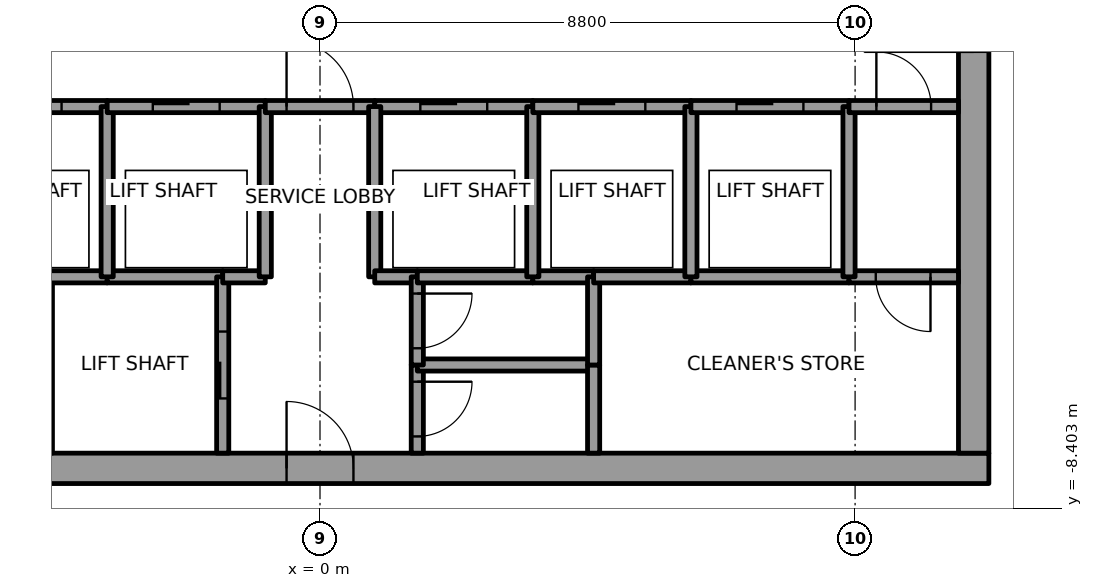
"""IFC4 building model, lengths in metres.
Left out: names, types, materials, properties, quantities, classifications, styles, units other than length and angle.
Written with IfcOpenShell. Run it as: python <this file> out.ifc"""

import sys

from ifc_helpers import new_model, si_unit, direction, frame, frame_2d, origin, place, context, subcontext, project, spatial, rectangle, extrude, element, fill, save


model = new_model("IFC4")
c1 = context("Model", 3, precision=1e-05, world=origin(), true_north=direction((0.0, 1.0)))
c2 = subcontext(c1, "Body", "Model", "MODEL_VIEW")
j1 = project(units=[si_unit("LENGTHUNIT", "METRE"), si_unit("PLANEANGLEUNIT", "RADIAN")], contexts=[c1])
p1 = place(None, origin())
s1 = spatial("IfcSite", under=j1, at=p1, CompositionType="ELEMENT")
p2 = place(p1, origin())
s2 = spatial("IfcBuilding", under=s1, at=p2, CompositionType="ELEMENT")
p3 = place(p2, frame((0.0, 0.0, 239.0)))
s3 = spatial("IfcBuildingStorey", under=s2, at=p3, CompositionType="ELEMENT", Elevation=239.0)
p4 = place(p3, frame((-11.0, -7.75, 0.0), z_axis=(0.0, 0.0, 1.0), x_axis=(1.0, 0.0, 0.0)))
e1 = element("IfcWall", 1, at=p4, inside=s3, PredefinedType="SHEAR", context=c2, shape_type="SweptSolid", body=[
    extrude(rectangle(XDim=22.0, YDim=0.5, at=frame_2d((11.0, 0.0))), origin(), (0.0, 0.0, 1.0), 4.0),
])
p5 = place(p4, frame((10.45, 0.0, 0.0)))
e2 = element("IfcOpeningElement", 2, at=p5, cuts=e1, PredefinedType="OPENING", context=c2, shape_type="SweptSolid", body=[
    extrude(rectangle(XDim=1.1, YDim=2.1, at=frame_2d((0.55, 1.05))), frame((0.0, 0.25, 0.0), z_axis=(0.0, -1.0, 0.0), x_axis=(1.0, 0.0, 0.0)), (0.0, 0.0, 1.0), 0.5),
])
p6 = place(p3, frame((10.75, -7.5, 0.0), z_axis=(0.0, 0.0, 1.0), x_axis=(0.0, 1.0, 0.0)))
e3 = element("IfcWall", 3, at=p6, inside=s3, PredefinedType="SHEAR", context=c2, shape_type="SweptSolid", body=[
    extrude(rectangle(XDim=15.0, YDim=0.5, at=frame_2d((7.5, 0.0))), origin(), (0.0, 0.0, 1.0), 4.0),
])
p7 = place(p6, frame((6.6, 0.0, 0.0)))
e4 = element("IfcOpeningElement", 4, at=p7, cuts=e3, PredefinedType="OPENING", context=c2, shape_type="SweptSolid", body=[
    extrude(rectangle(XDim=1.8, YDim=2.1, at=frame_2d((0.9, 1.05))), frame((0.0, 0.25, 0.0), z_axis=(0.0, -1.0, 0.0), x_axis=(1.0, 0.0, 0.0)), (0.0, 0.0, 1.0), 0.5),
])
p8 = place(p3, frame((-6.1, -1.8, 0.0), z_axis=(0.0, 0.0, 1.0), x_axis=(1.0, 0.0, 0.0)))
e5 = element("IfcWall", 5, at=p8, inside=s3, PredefinedType="SOLIDWALL", context=c2, shape_type="SweptSolid", body=[
    extrude(rectangle(XDim=2.6, YDim=0.2, at=frame_2d((1.3, 0.0))), origin(), (0.0, 0.0, 1.0), 3.85),
])
p9 = place(p8, frame((0.75, 0.0, 0.0)))
e6 = element("IfcOpeningElement", 6, at=p9, cuts=e5, PredefinedType="OPENING", context=c2, shape_type="SweptSolid", body=[
    extrude(rectangle(XDim=1.1, YDim=2.1, at=frame_2d((0.55, 1.05))), frame((0.0, 0.1, 0.0), z_axis=(0.0, -1.0, 0.0), x_axis=(1.0, 0.0, 0.0)), (0.0, 0.0, 1.0), 0.2),
])
p10 = place(p3, frame((-4.5, -4.6, 0.0), z_axis=(0.0, 0.0, 1.0), x_axis=(1.0, 0.0, 0.0)))
e7 = element("IfcWall", 7, at=p10, inside=s3, PredefinedType="SOLIDWALL", context=c2, shape_type="SweptSolid", body=[
    extrude(rectangle(XDim=1.0, YDim=0.2, at=frame_2d((0.5, 0.0))), origin(), (0.0, 0.0, 1.0), 3.85),
])
p11 = place(p3, frame((-3.5, -4.6, 0.0), z_axis=(0.0, 0.0, 1.0), x_axis=(1.0, 0.0, 0.0)))
e8 = element("IfcWall", 8, at=p11, inside=s3, PredefinedType="SOLIDWALL", context=c2, shape_type="SweptSolid", body=[
    extrude(rectangle(XDim=1.9, YDim=0.2, at=frame_2d((0.95, 0.0))), origin(), (0.0, 0.0, 1.0), 3.85),
])
p12 = place(p3, frame((-3.5, -4.6, 0.0), z_axis=(0.0, 0.0, 1.0), x_axis=(0.0, 1.0, 0.0)))
e9 = element("IfcWall", 9, at=p12, inside=s3, PredefinedType="SOLIDWALL", context=c2, shape_type="SweptSolid", body=[
    extrude(rectangle(XDim=2.8, YDim=0.2, at=frame_2d((1.4, 0.0))), origin(), (0.0, 0.0, 1.0), 3.85),
])
p13 = place(p3, frame((-3.5, -1.8, 0.0), z_axis=(0.0, 0.0, 1.0), x_axis=(1.0, 0.0, 0.0)))
e10 = element("IfcWall", 10, at=p13, inside=s3, PredefinedType="SOLIDWALL", context=c2, shape_type="SweptSolid", body=[
    extrude(rectangle(XDim=2.6, YDim=0.2, at=frame_2d((1.3, 0.0))), origin(), (0.0, 0.0, 1.0), 3.85),
])
p14 = place(p13, frame((0.75, 0.0, 0.0)))
e11 = element("IfcOpeningElement", 11, at=p14, cuts=e10, PredefinedType="OPENING", context=c2, shape_type="SweptSolid", body=[
    extrude(rectangle(XDim=1.1, YDim=2.1, at=frame_2d((0.55, 1.05))), frame((0.0, 0.1, 0.0), z_axis=(0.0, -1.0, 0.0), x_axis=(1.0, 0.0, 0.0)), (0.0, 0.0, 1.0), 0.2),
])
p15 = place(p3, frame((-1.6, -7.5, 0.0), z_axis=(0.0, 0.0, 1.0), x_axis=(0.0, 1.0, 0.0)))
e12 = element("IfcWall", 12, at=p15, inside=s3, PredefinedType="SOLIDWALL", context=c2, shape_type="SweptSolid", body=[
    extrude(rectangle(XDim=2.9, YDim=0.2, at=frame_2d((1.45, 0.0))), origin(), (0.0, 0.0, 1.0), 3.85),
])
p16 = place(p15, frame((0.9, 0.0, 0.0)))
e13 = element("IfcOpeningElement", 13, at=p16, cuts=e12, PredefinedType="OPENING", context=c2, shape_type="SweptSolid", body=[
    extrude(rectangle(XDim=1.1, YDim=2.1, at=frame_2d((0.55, 1.05))), frame((0.0, 0.1, 0.0), z_axis=(0.0, -1.0, 0.0), x_axis=(1.0, 0.0, 0.0)), (0.0, 0.0, 1.0), 0.2),
])
p17 = place(p3, frame((-1.6, -4.6, 0.0), z_axis=(0.0, 0.0, 1.0), x_axis=(1.0, 0.0, 0.0)))
e14 = element("IfcWall", 14, at=p17, inside=s3, PredefinedType="SOLIDWALL", context=c2, shape_type="SweptSolid", body=[
    extrude(rectangle(XDim=0.7, YDim=0.2, at=frame_2d((0.35, 0.0))), origin(), (0.0, 0.0, 1.0), 3.85),
])
p18 = place(p3, frame((-0.9, -4.6, 0.0), z_axis=(0.0, 0.0, 1.0), x_axis=(0.0, 1.0, 0.0)))
e15 = element("IfcWall", 15, at=p18, inside=s3, PredefinedType="SOLIDWALL", context=c2, shape_type="SweptSolid", body=[
    extrude(rectangle(XDim=2.8, YDim=0.2, at=frame_2d((1.4, 0.0))), origin(), (0.0, 0.0, 1.0), 3.85),
])
p19 = place(p3, frame((-0.9, -1.8, 0.0), z_axis=(0.0, 0.0, 1.0), x_axis=(1.0, 0.0, 0.0)))
e16 = element("IfcWall", 16, at=p19, inside=s3, PredefinedType="SOLIDWALL", context=c2, shape_type="SweptSolid", body=[
    extrude(rectangle(XDim=1.8, YDim=0.2, at=frame_2d((0.9, 0.0))), origin(), (0.0, 0.0, 1.0), 3.85),
])
p20 = place(p19, frame((0.35, 0.0, 0.0)))
e17 = element("IfcOpeningElement", 17, at=p20, cuts=e16, PredefinedType="OPENING", context=c2, shape_type="SweptSolid", body=[
    extrude(rectangle(XDim=1.1, YDim=2.1, at=frame_2d((0.55, 1.05))), frame((0.0, 0.1, 0.0), z_axis=(0.0, -1.0, 0.0), x_axis=(1.0, 0.0, 0.0)), (0.0, 0.0, 1.0), 0.2),
])
p21 = place(p3, frame((0.9, -1.8, 0.0), z_axis=(0.0, 0.0, 1.0), x_axis=(1.0, 0.0, 0.0)))
e18 = element("IfcWall", 18, at=p21, inside=s3, PredefinedType="SOLIDWALL", context=c2, shape_type="SweptSolid", body=[
    extrude(rectangle(XDim=2.6, YDim=0.2, at=frame_2d((1.3, 0.0))), origin(), (0.0, 0.0, 1.0), 3.85),
])
p22 = place(p21, frame((0.75, 0.0, 0.0)))
e19 = element("IfcOpeningElement", 19, at=p22, cuts=e18, PredefinedType="OPENING", context=c2, shape_type="SweptSolid", body=[
    extrude(rectangle(XDim=1.1, YDim=2.1, at=frame_2d((0.55, 1.05))), frame((0.0, 0.1, 0.0), z_axis=(0.0, -1.0, 0.0), x_axis=(1.0, 0.0, 0.0)), (0.0, 0.0, 1.0), 0.2),
])
p23 = place(p3, frame((0.9, -1.8, 0.0), z_axis=(0.0, 0.0, 1.0), x_axis=(0.0, -1.0, 0.0)))
e20 = element("IfcWall", 20, at=p23, inside=s3, PredefinedType="SOLIDWALL", context=c2, shape_type="SweptSolid", body=[
    extrude(rectangle(XDim=2.8, YDim=0.2, at=frame_2d((1.4, 0.0))), origin(), (0.0, 0.0, 1.0), 3.85),
])
p24 = place(p3, frame((0.9, -4.6, 0.0), z_axis=(0.0, 0.0, 1.0), x_axis=(1.0, 0.0, 0.0)))
e21 = element("IfcWall", 21, at=p24, inside=s3, PredefinedType="SOLIDWALL", context=c2, shape_type="SweptSolid", body=[
    extrude(rectangle(XDim=0.7, YDim=0.2, at=frame_2d((0.35, 0.0))), origin(), (0.0, 0.0, 1.0), 3.85),
])
p25 = place(p3, frame((1.6, -6.05, 0.0), z_axis=(0.0, 0.0, 1.0), x_axis=(0.0, -1.0, 0.0)))
e22 = element("IfcWall", 22, at=p25, inside=s3, PredefinedType="SOLIDWALL", context=c2, shape_type="SweptSolid", body=[
    extrude(rectangle(XDim=1.45, YDim=0.2, at=frame_2d((0.725, 0.0))), origin(), (0.0, 0.0, 1.0), 3.85),
])
p26 = place(p25, frame((0.275, 0.0, 0.0)))
e23 = element("IfcOpeningElement", 23, at=p26, cuts=e22, PredefinedType="OPENING", context=c2, shape_type="SweptSolid", body=[
    extrude(rectangle(XDim=0.9, YDim=2.1, at=frame_2d((0.45, 1.05))), frame((0.0, 0.1, 0.0), z_axis=(0.0, -1.0, 0.0), x_axis=(1.0, 0.0, 0.0)), (0.0, 0.0, 1.0), 0.2),
])
p27 = place(p3, frame((4.5, -6.05, 0.0), z_axis=(0.0, 0.0, 1.0), x_axis=(-1.0, 0.0, 0.0)))
e24 = element("IfcWall", 24, at=p27, inside=s3, PredefinedType="SOLIDWALL", context=c2, shape_type="SweptSolid", body=[
    extrude(rectangle(XDim=2.9, YDim=0.2, at=frame_2d((1.45, 0.0))), origin(), (0.0, 0.0, 1.0), 3.85),
])
p28 = place(p3, frame((1.6, -4.6, 0.0), z_axis=(0.0, 0.0, 1.0), x_axis=(0.0, -1.0, 0.0)))
e25 = element("IfcWall", 25, at=p28, inside=s3, PredefinedType="SOLIDWALL", context=c2, shape_type="SweptSolid", body=[
    extrude(rectangle(XDim=1.45, YDim=0.2, at=frame_2d((0.725, 0.0))), origin(), (0.0, 0.0, 1.0), 3.85),
])
p29 = place(p28, frame((0.275, 0.0, 0.0)))
e26 = element("IfcOpeningElement", 26, at=p29, cuts=e25, PredefinedType="OPENING", context=c2, shape_type="SweptSolid", body=[
    extrude(rectangle(XDim=0.9, YDim=2.1, at=frame_2d((0.45, 1.05))), frame((0.0, 0.1, 0.0), z_axis=(0.0, -1.0, 0.0), x_axis=(1.0, 0.0, 0.0)), (0.0, 0.0, 1.0), 0.2),
])
p30 = place(p3, frame((3.5, -4.6, 0.0), z_axis=(0.0, 0.0, 1.0), x_axis=(-1.0, 0.0, 0.0)))
e27 = element("IfcWall", 27, at=p30, inside=s3, PredefinedType="SOLIDWALL", context=c2, shape_type="SweptSolid", body=[
    extrude(rectangle(XDim=1.9, YDim=0.2, at=frame_2d((0.95, 0.0))), origin(), (0.0, 0.0, 1.0), 3.85),
])
p31 = place(p3, frame((4.5, -4.6, 0.0), z_axis=(0.0, 0.0, 1.0), x_axis=(-1.0, 0.0, 0.0)))
e28 = element("IfcWall", 28, at=p31, inside=s3, PredefinedType="SOLIDWALL", context=c2, shape_type="SweptSolid", body=[
    extrude(rectangle(XDim=1.0, YDim=0.2, at=frame_2d((0.5, 0.0))), origin(), (0.0, 0.0, 1.0), 3.85),
])
p32 = place(p3, frame((3.5, -4.6, 0.0), z_axis=(0.0, 0.0, 1.0), x_axis=(0.0, 1.0, 0.0)))
e29 = element("IfcWall", 29, at=p32, inside=s3, PredefinedType="SOLIDWALL", context=c2, shape_type="SweptSolid", body=[
    extrude(rectangle(XDim=2.8, YDim=0.2, at=frame_2d((1.4, 0.0))), origin(), (0.0, 0.0, 1.0), 3.85),
])
p33 = place(p3, frame((3.5, -1.8, 0.0), z_axis=(0.0, 0.0, 1.0), x_axis=(1.0, 0.0, 0.0)))
e30 = element("IfcWall", 30, at=p33, inside=s3, PredefinedType="SOLIDWALL", context=c2, shape_type="SweptSolid", body=[
    extrude(rectangle(XDim=2.6, YDim=0.2, at=frame_2d((1.3, 0.0))), origin(), (0.0, 0.0, 1.0), 3.85),
])
p34 = place(p33, frame((0.75, 0.0, 0.0)))
e31 = element("IfcOpeningElement", 31, at=p34, cuts=e30, PredefinedType="OPENING", context=c2, shape_type="SweptSolid", body=[
    extrude(rectangle(XDim=1.1, YDim=2.1, at=frame_2d((0.55, 1.05))), frame((0.0, 0.1, 0.0), z_axis=(0.0, -1.0, 0.0), x_axis=(1.0, 0.0, 0.0)), (0.0, 0.0, 1.0), 0.2),
])
for number, where, z_axis, x_axis in (
    (32, (4.5, -6.05, 0.0), (0.0, 0.0, 1.0), (0.0, -1.0, 0.0)),
    (33, (4.5, -4.6, 0.0), (0.0, 0.0, 1.0), (0.0, -1.0, 0.0)),
):
    element("IfcWall", number, at=place(p3, frame(where, z_axis=z_axis, x_axis=x_axis)), inside=s3, PredefinedType="SOLIDWALL", context=c2, shape_type="SweptSolid", body=[
        extrude(rectangle(XDim=1.45, YDim=0.2, at=frame_2d((0.725, 0.0))), origin(), (0.0, 0.0, 1.0), 3.85),
    ])
p35 = place(p3, frame((6.1, -4.6, 0.0), z_axis=(0.0, 0.0, 1.0), x_axis=(-1.0, 0.0, 0.0)))
e34 = element("IfcWall", 34, at=p35, inside=s3, PredefinedType="SOLIDWALL", context=c2, shape_type="SweptSolid", body=[
    extrude(rectangle(XDim=1.6, YDim=0.2, at=frame_2d((0.8, 0.0))), origin(), (0.0, 0.0, 1.0), 3.85),
])
p36 = place(p3, frame((8.7, -4.6, 0.0), z_axis=(0.0, 0.0, 1.0), x_axis=(-1.0, 0.0, 0.0)))
e35 = element("IfcWall", 35, at=p36, inside=s3, PredefinedType="SOLIDWALL", context=c2, shape_type="SweptSolid", body=[
    extrude(rectangle(XDim=2.6, YDim=0.2, at=frame_2d((1.3, 0.0))), origin(), (0.0, 0.0, 1.0), 3.85),
])
p37 = place(p3, frame((6.1, -4.6, 0.0), z_axis=(0.0, 0.0, 1.0), x_axis=(0.0, 1.0, 0.0)))
e36 = element("IfcWall", 36, at=p37, inside=s3, PredefinedType="SOLIDWALL", context=c2, shape_type="SweptSolid", body=[
    extrude(rectangle(XDim=2.8, YDim=0.2, at=frame_2d((1.4, 0.0))), origin(), (0.0, 0.0, 1.0), 3.85),
])
p38 = place(p3, frame((6.1, -1.8, 0.0), z_axis=(0.0, 0.0, 1.0), x_axis=(1.0, 0.0, 0.0)))
e37 = element("IfcWall", 37, at=p38, inside=s3, PredefinedType="SOLIDWALL", context=c2, shape_type="SweptSolid", body=[
    extrude(rectangle(XDim=2.6, YDim=0.2, at=frame_2d((1.3, 0.0))), origin(), (0.0, 0.0, 1.0), 3.85),
])
p39 = place(p38, frame((0.75, 0.0, 0.0)))
e38 = element("IfcOpeningElement", 38, at=p39, cuts=e37, PredefinedType="OPENING", context=c2, shape_type="SweptSolid", body=[
    extrude(rectangle(XDim=1.1, YDim=2.1, at=frame_2d((0.55, 1.05))), frame((0.0, 0.1, 0.0), z_axis=(0.0, -1.0, 0.0), x_axis=(1.0, 0.0, 0.0)), (0.0, 0.0, 1.0), 0.2),
])
p40 = place(p3, frame((10.5, -4.6, 0.0), z_axis=(0.0, 0.0, 1.0), x_axis=(-1.0, 0.0, 0.0)))
e39 = element("IfcWall", 39, at=p40, inside=s3, PredefinedType="SOLIDWALL", context=c2, shape_type="SweptSolid", body=[
    extrude(rectangle(XDim=1.8, YDim=0.2, at=frame_2d((0.9, 0.0))), origin(), (0.0, 0.0, 1.0), 3.85),
])
p41 = place(p40, frame((0.46, 0.0, 0.0)))
e40 = element("IfcOpeningElement", 40, at=p41, cuts=e39, PredefinedType="OPENING", context=c2, shape_type="SweptSolid", body=[
    extrude(rectangle(XDim=0.9, YDim=2.1, at=frame_2d((0.45, 1.05))), frame((0.0, 0.1, 0.0), z_axis=(0.0, -1.0, 0.0), x_axis=(1.0, 0.0, 0.0)), (0.0, 0.0, 1.0), 0.2),
])
p42 = place(p3, frame((8.7, -1.8, 0.0), z_axis=(0.0, 0.0, 1.0), x_axis=(0.0, -1.0, 0.0)))
e41 = element("IfcWall", 41, at=p42, inside=s3, PredefinedType="SOLIDWALL", context=c2, shape_type="SweptSolid", body=[
    extrude(rectangle(XDim=2.8, YDim=0.2, at=frame_2d((1.4, 0.0))), origin(), (0.0, 0.0, 1.0), 3.85),
])
p43 = place(p3, frame((8.7, -1.8, 0.0), z_axis=(0.0, 0.0, 1.0), x_axis=(1.0, 0.0, 0.0)))
e42 = element("IfcWall", 42, at=p43, inside=s3, PredefinedType="SOLIDWALL", context=c2, shape_type="SweptSolid", body=[
    extrude(rectangle(XDim=1.8, YDim=0.2, at=frame_2d((0.9, 0.0))), origin(), (0.0, 0.0, 1.0), 3.85),
])
p44 = place(p43, frame((0.45, 0.0, 0.0)))
e43 = element("IfcOpeningElement", 43, at=p44, cuts=e42, PredefinedType="OPENING", context=c2, shape_type="SweptSolid", body=[
    extrude(rectangle(XDim=0.9, YDim=2.1, at=frame_2d((0.45, 1.05))), frame((0.0, 0.1, 0.0), z_axis=(0.0, -1.0, 0.0), x_axis=(1.0, 0.0, 0.0)), (0.0, 0.0, 1.0), 0.2),
])
p45 = place(p9, origin())
e44 = element("IfcDoor", 44, at=p45, inside=s3, OperationType="SLIDING_TO_LEFT", PredefinedType="DOOR", context=c2, shape_type="SweptSolid", body=[
    extrude(rectangle(XDim=1.1, YDim=2.1, at=frame_2d((0.55, 1.05))), frame((0.0, 0.025, 0.0), z_axis=(0.0, -1.0, 0.0), x_axis=(1.0, 0.0, 0.0)), (0.0, 0.0, 1.0), 0.05),
])
fill(e6, e44)
p46 = place(p14, origin())
e45 = element("IfcDoor", 45, at=p46, inside=s3, OperationType="SLIDING_TO_RIGHT", PredefinedType="DOOR", context=c2, shape_type="SweptSolid", body=[
    extrude(rectangle(XDim=1.1, YDim=2.1, at=frame_2d((0.55, 1.05))), frame((0.0, 0.025, 0.0), z_axis=(0.0, -1.0, 0.0), x_axis=(1.0, 0.0, 0.0)), (0.0, 0.0, 1.0), 0.05),
])
fill(e11, e45)
p47 = place(p22, origin())
e46 = element("IfcDoor", 46, at=p47, inside=s3, OperationType="SLIDING_TO_LEFT", PredefinedType="DOOR", context=c2, shape_type="SweptSolid", body=[
    extrude(rectangle(XDim=1.1, YDim=2.1, at=frame_2d((0.55, 1.05))), frame((0.0, 0.025, 0.0), z_axis=(0.0, -1.0, 0.0), x_axis=(1.0, 0.0, 0.0)), (0.0, 0.0, 1.0), 0.05),
])
fill(e19, e46)
p48 = place(p34, origin())
e47 = element("IfcDoor", 47, at=p48, inside=s3, OperationType="SLIDING_TO_LEFT", PredefinedType="DOOR", context=c2, shape_type="SweptSolid", body=[
    extrude(rectangle(XDim=1.1, YDim=2.1, at=frame_2d((0.55, 1.05))), frame((0.0, 0.025, 0.0), z_axis=(0.0, -1.0, 0.0), x_axis=(1.0, 0.0, 0.0)), (0.0, 0.0, 1.0), 0.05),
])
fill(e31, e47)
p49 = place(p39, origin())
e48 = element("IfcDoor", 48, at=p49, inside=s3, OperationType="SLIDING_TO_RIGHT", PredefinedType="DOOR", context=c2, shape_type="SweptSolid", body=[
    extrude(rectangle(XDim=1.1, YDim=2.1, at=frame_2d((0.55, 1.05))), frame((0.0, 0.025, 0.0), z_axis=(0.0, -1.0, 0.0), x_axis=(1.0, 0.0, 0.0)), (0.0, 0.0, 1.0), 0.05),
])
fill(e38, e48)
p50 = place(p16, origin())
e49 = element("IfcDoor", 49, at=p50, inside=s3, OperationType="SLIDING_TO_RIGHT", PredefinedType="DOOR", context=c2, shape_type="SweptSolid", body=[
    extrude(rectangle(XDim=1.1, YDim=2.1, at=frame_2d((0.55, 1.05))), frame((0.0, 0.025, 0.0), z_axis=(0.0, -1.0, 0.0), x_axis=(1.0, 0.0, 0.0)), (0.0, 0.0, 1.0), 0.05),
])
fill(e13, e49)
p51 = place(p20, origin())
e50 = element("IfcDoor", 50, at=p51, inside=s3, OperationType="SINGLE_SWING_LEFT", PredefinedType="DOOR", context=c2, shape_type="SweptSolid", body=[
    extrude(rectangle(XDim=1.1, YDim=2.1, at=frame_2d((0.55, 1.05))), frame((0.0, 0.025, 0.0), z_axis=(0.0, -1.0, 0.0), x_axis=(1.0, 0.0, 0.0)), (0.0, 0.0, 1.0), 0.05),
])
fill(e17, e50)
p52 = place(p41, origin())
e51 = element("IfcDoor", 51, at=p52, inside=s3, OperationType="SINGLE_SWING_LEFT", PredefinedType="DOOR", context=c2, shape_type="SweptSolid", body=[
    extrude(rectangle(XDim=0.9, YDim=2.1, at=frame_2d((0.45, 1.05))), frame((0.0, 0.025, 0.0), z_axis=(0.0, -1.0, 0.0), x_axis=(1.0, 0.0, 0.0)), (0.0, 0.0, 1.0), 0.05),
])
fill(e40, e51)
p53 = place(p44, origin())
e52 = element("IfcDoor", 52, at=p53, inside=s3, OperationType="SINGLE_SWING_LEFT", PredefinedType="DOOR", context=c2, shape_type="SweptSolid", body=[
    extrude(rectangle(XDim=0.9, YDim=2.1, at=frame_2d((0.45, 1.05))), frame((0.0, 0.025, 0.0), z_axis=(0.0, -1.0, 0.0), x_axis=(1.0, 0.0, 0.0)), (0.0, 0.0, 1.0), 0.05),
])
fill(e43, e52)
p54 = place(p26, origin())
e53 = element("IfcDoor", 53, at=p54, inside=s3, OperationType="SINGLE_SWING_RIGHT", PredefinedType="DOOR", context=c2, shape_type="SweptSolid", body=[
    extrude(rectangle(XDim=0.9, YDim=2.1, at=frame_2d((0.45, 1.05))), frame((0.0, 0.025, 0.0), z_axis=(0.0, -1.0, 0.0), x_axis=(1.0, 0.0, 0.0)), (0.0, 0.0, 1.0), 0.05),
])
fill(e23, e53)
p55 = place(p29, origin())
e54 = element("IfcDoor", 54, at=p55, inside=s3, OperationType="SINGLE_SWING_LEFT", PredefinedType="DOOR", context=c2, shape_type="SweptSolid", body=[
    extrude(rectangle(XDim=0.9, YDim=2.1, at=frame_2d((0.45, 1.05))), frame((0.0, 0.025, 0.0), z_axis=(0.0, -1.0, 0.0), x_axis=(1.0, 0.0, 0.0)), (0.0, 0.0, 1.0), 0.05),
])
fill(e26, e54)
p56 = place(p7, origin())
e55 = element("IfcDoor", 55, at=p56, inside=s3, OperationType="DOUBLE_DOOR_SINGLE_SWING", PredefinedType="DOOR", context=c2, shape_type="SweptSolid", body=[
    extrude(rectangle(XDim=1.8, YDim=2.1, at=frame_2d((0.9, 1.05))), frame((0.0, 0.025, 0.0), z_axis=(0.0, -1.0, 0.0), x_axis=(1.0, 0.0, 0.0)), (0.0, 0.0, 1.0), 0.05),
])
fill(e4, e55)
p57 = place(p5, origin())
e56 = element("IfcDoor", 56, at=p57, inside=s3, OperationType="SINGLE_SWING_LEFT", PredefinedType="DOOR", context=c2, shape_type="SweptSolid", body=[
    extrude(rectangle(XDim=1.1, YDim=2.1, at=frame_2d((0.55, 1.05))), frame((0.0, 0.025, 0.0), z_axis=(0.0, -1.0, 0.0), x_axis=(1.0, 0.0, 0.0)), (0.0, 0.0, 1.0), 0.05),
])
fill(e2, e56)
save(model, sys.argv[1])
